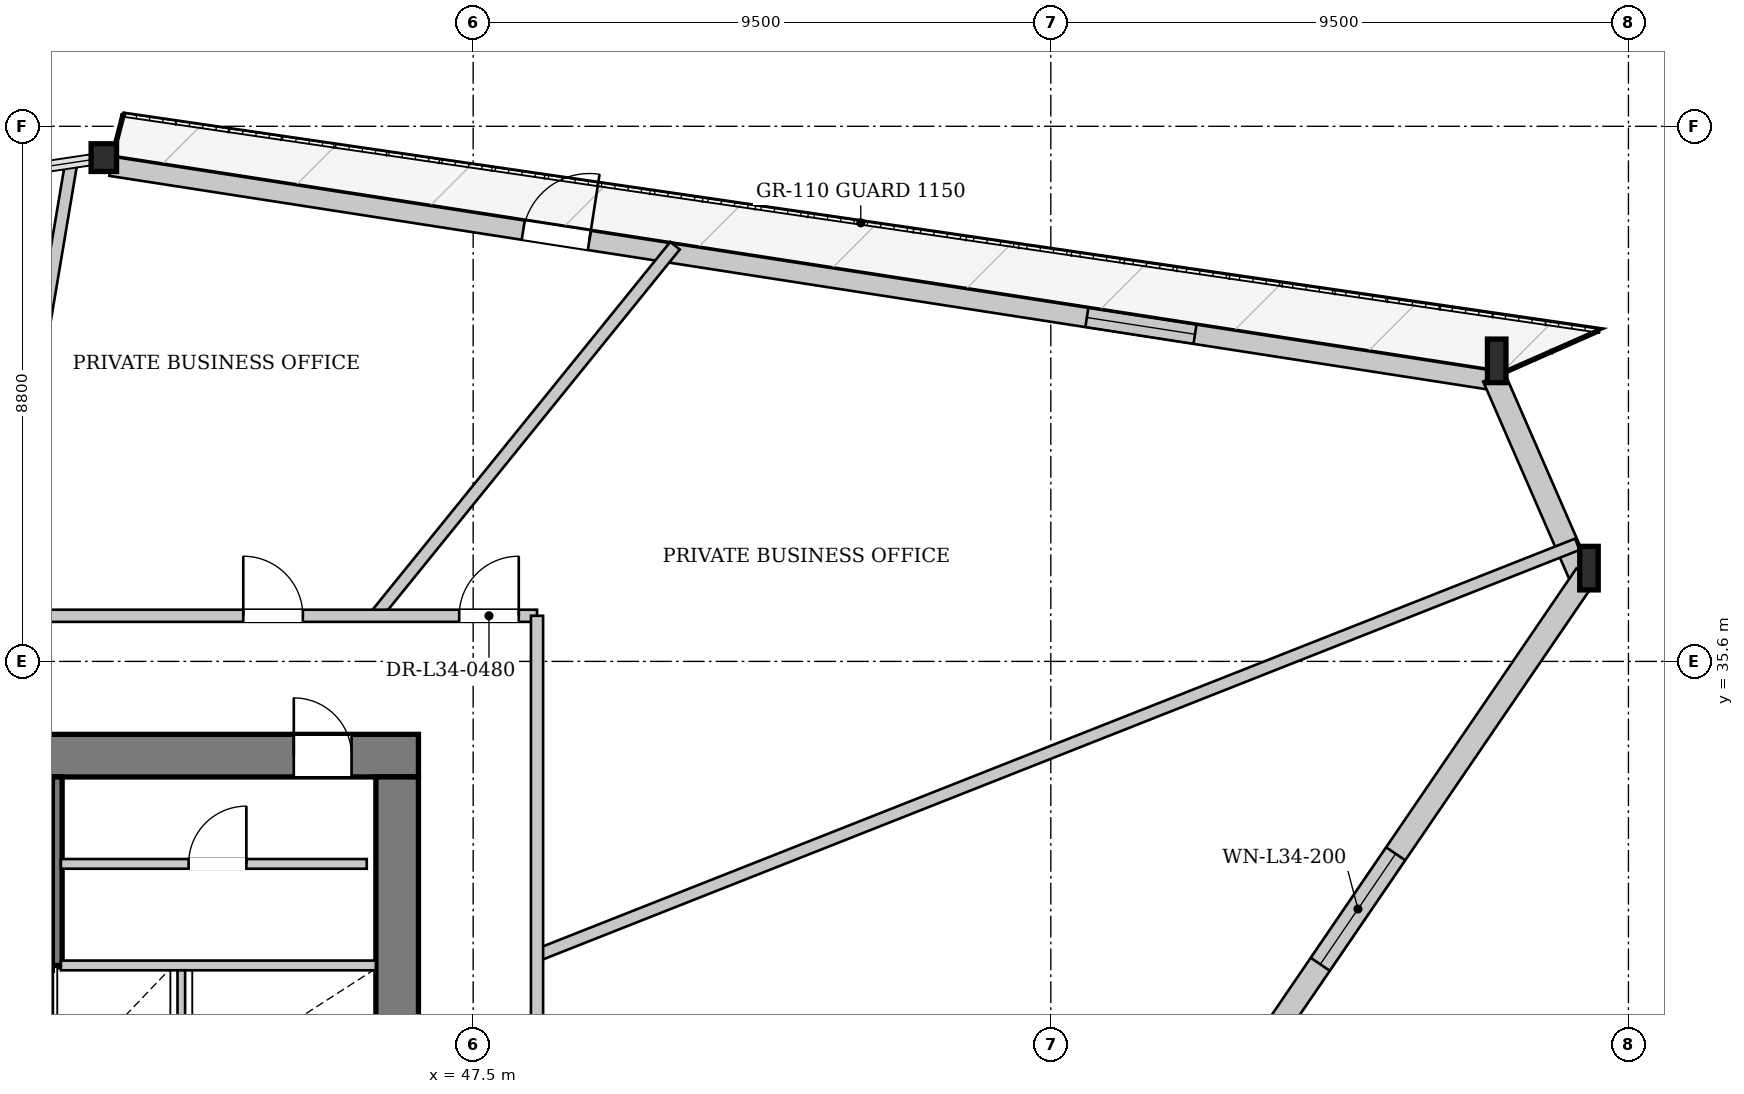
"""IFC4 building model, lengths in metres.
Left out: names, types, materials, properties, quantities, classifications, styles, units other than length and angle.
Written with IfcOpenShell. Run it as: python <this file> out.ifc"""

import sys

from ifc_helpers import new_model, si_unit, direction, frame, frame_2d, origin, origin_2d, place, context, subcontext, project, spatial, rectangle, i_section, extrude, source, transform, mapped, element, fill, save


model = new_model("IFC4")
c1 = context("Model", 3, precision=1e-05, world=origin(), true_north=direction((0.0, 1.0)))
c2 = subcontext(c1, "Body", "Model", "MODEL_VIEW")
j1 = project(units=[si_unit("LENGTHUNIT", "METRE"), si_unit("PLANEANGLEUNIT", "RADIAN")], contexts=[c1])
p1 = place(None, origin())
s1 = spatial("IfcSite", under=j1, at=p1, CompositionType="ELEMENT")
p2 = place(p1, origin())
s2 = spatial("IfcBuilding", under=s1, at=p2, CompositionType="ELEMENT")
p3 = place(p2, frame((0.0, 0.0, 130.55)))
s3 = spatial("IfcBuildingStorey", under=s2, at=p3, CompositionType="ELEMENT", Elevation=130.55)
m1 = source(origin(), c2, "Body", "SweptSolid", [
    extrude(i_section(OverallWidth=0.304, OverallDepth=0.716, WebThickness=0.021, FlangeThickness=0.04, at=origin_2d()), origin(), (0.0, 0.0, 1.0), 3.42),
])
p4 = place(p3, frame((65.958, 36.916, 0.0), z_axis=(-0.062468010228, 0.127648916899, 0.989850242063), x_axis=(-0.898212502069, -0.43956148731, 0.0)))
e1 = element("IfcColumn", 1, at=p4, inside=s3, PredefinedType="COLUMN", context=c2, shape_type="MappedRepresentation", body=[
    mapped(m1, transform((0.0, 0.0, 0.0), x_axis=(1.0, 0.0, 0.0), y_axis=(0.0, 1.0, 0.0), z_axis=(0.0, 0.0, 1.0), scale=1.0)),
])
m2 = source(origin(), c2, "Body", "SweptSolid", [
    extrude(i_section(OverallWidth=0.304, OverallDepth=0.716, WebThickness=0.021, FlangeThickness=0.04, at=origin_2d()), origin(), (0.0, 0.0, 1.0), 3.415),
])
p5 = place(p3, frame((64.459, 40.354, 0.0), z_axis=(-0.073629240078, 0.110586829515, 0.991135353089), x_axis=(-0.832381260917, -0.554203425174, 0.0)))
e2 = element("IfcColumn", 2, at=p5, inside=s3, PredefinedType="COLUMN", context=c2, shape_type="MappedRepresentation", body=[
    mapped(m2, transform((0.0, 0.0, 0.0), x_axis=(1.0, 0.0, 0.0), y_axis=(0.0, 1.0, 0.0), z_axis=(0.0, 0.0, 1.0), scale=1.0)),
])
m3 = source(origin(), c2, "Body", "SweptSolid", [
    extrude(i_section(OverallWidth=0.418, OverallDepth=0.455, WebThickness=0.038, FlangeThickness=0.059, at=origin_2d()), origin(), (0.0, 0.0, 1.0), 3.397),
])
p6 = place(p3, frame((41.566, 43.901, 0.0), z_axis=(-0.082512335001, -0.009487481028, 0.996544882219), x_axis=(0.114229941236, -0.993454337413, 0.0)))
e3 = element("IfcColumn", 3, at=p6, inside=s3, PredefinedType="COLUMN", context=c2, shape_type="MappedRepresentation", body=[
    mapped(m3, transform((0.0, 0.0, 0.0), x_axis=(1.0, 0.0, 0.0), y_axis=(0.0, 1.0, 0.0), z_axis=(0.0, 0.0, 1.0), scale=1.0)),
])
p7 = place(p3, frame((41.541, 43.743, 0.0), z_axis=(0.0, 0.0, 1.0), x_axis=(0.988207138031, -0.153122997436, 0.0)))
e4 = element("IfcWall", 4, at=p7, inside=s3, PredefinedType="SOLIDWALL", context=c2, shape_type="SweptSolid", body=[
    extrude(rectangle(XDim=23.167, YDim=0.32, at=frame_2d((11.583, 0.0))), origin(), (0.0, 0.0, 1.0), 2.692),
])
p8 = place(p7, frame((6.863, 0.0, 0.0)))
e5 = element("IfcOpeningElement", 5, at=p8, cuts=e4, PredefinedType="OPENING", context=c2, shape_type="SweptSolid", body=[
    extrude(rectangle(XDim=1.1, YDim=2.3, at=frame_2d((0.55, 1.15))), frame((0.0, 0.17, 0.0), z_axis=(0.0, -1.0, 0.0), x_axis=(1.0, 0.0, 0.0)), (0.0, 0.0, 1.0), 0.34),
])
p9 = place(p7, frame((16.243, 0.0, 0.372)))
e6 = element("IfcOpeningElement", 6, at=p9, cuts=e4, PredefinedType="OPENING", context=c2, shape_type="SweptSolid", body=[
    extrude(rectangle(XDim=1.8, YDim=2.2, at=frame_2d((0.9, 1.1))), frame((0.0, 0.17, 0.0), z_axis=(0.0, -1.0, 0.0), x_axis=(1.0, 0.0, 0.0)), (0.0, 0.0, 1.0), 0.34),
])
p10 = place(p3, frame((64.285, 40.278, 0.0), z_axis=(0.0, 0.0, 1.0), x_axis=(0.399568588601, -0.916703301512, 0.0)))
e7 = element("IfcWall", 7, at=p10, inside=s3, PredefinedType="SOLIDWALL", context=c2, shape_type="SweptSolid", body=[
    extrude(rectangle(XDim=3.75, YDim=0.38, at=frame_2d((1.875, 0.0))), origin(), (0.0, 0.0, 1.0), 2.692),
])
p11 = place(p3, frame((65.801, 37.023, 0.0), z_axis=(0.0, 0.0, 1.0), x_axis=(-0.563622492104, -0.826032497179, 0.0)))
e8 = element("IfcWall", 8, at=p11, inside=s3, PredefinedType="SOLIDWALL", context=c2, shape_type="SweptSolid", body=[
    extrude(rectangle(XDim=23.758, YDim=0.38, at=frame_2d((11.879, 0.0))), origin(), (0.0, 0.0, 1.0), 2.692),
])
p12 = place(p11, frame((5.552, 0.0, 0.322)))
e9 = element("IfcOpeningElement", 9, at=p12, cuts=e8, PredefinedType="OPENING", context=c2, shape_type="SweptSolid", body=[
    extrude(rectangle(XDim=2.2, YDim=2.25, at=frame_2d((1.1, 1.125))), frame((0.0, 0.2, 0.0), z_axis=(0.0, -1.0, 0.0), x_axis=(1.0, 0.0, 0.0)), (0.0, 0.0, 1.0), 0.4),
])
p13 = place(p11, frame((16.756, 0.0, 0.322)))
e10 = element("IfcOpeningElement", 10, at=p13, cuts=e8, PredefinedType="OPENING", context=c2, shape_type="SweptSolid", body=[
    extrude(rectangle(XDim=2.2, YDim=2.25, at=frame_2d((1.1, 1.125))), frame((0.0, 0.2, 0.0), z_axis=(0.0, -1.0, 0.0), x_axis=(1.0, 0.0, 0.0)), (0.0, 0.0, 1.0), 0.4),
])
p14 = place(p3, frame((29.4, 34.05, 0.0), z_axis=(0.0, 0.0, 1.0), x_axis=(1.0, 0.0, 0.0)))
e11 = element("IfcWall", 11, at=p14, inside=s3, PredefinedType="SHEAR", context=c2, shape_type="SweptSolid", body=[
    extrude(rectangle(XDim=17.2, YDim=0.7, at=frame_2d((8.6, 0.0))), origin(), (0.0, 0.0, 1.0), 3.3),
])
p15 = place(p14, frame((1.7, 0.0, 0.0)))
e12 = element("IfcOpeningElement", 12, at=p15, cuts=e11, PredefinedType="OPENING", context=c2, shape_type="SweptSolid", body=[
    extrude(rectangle(XDim=0.95, YDim=2.1, at=frame_2d((0.475, 1.05))), frame((0.0, 0.36, 0.0), z_axis=(0.0, -1.0, 0.0), x_axis=(1.0, 0.0, 0.0)), (0.0, 0.0, 1.0), 0.72),
])
p16 = place(p14, frame((4.08, 0.0, 0.0)))
e13 = element("IfcOpeningElement", 13, at=p16, cuts=e11, PredefinedType="OPENING", context=c2, shape_type="SweptSolid", body=[
    extrude(rectangle(XDim=1.32, YDim=2.2, at=frame_2d((0.66, 1.1))), frame((0.0, 0.36, 0.0), z_axis=(0.0, -1.0, 0.0), x_axis=(1.0, 0.0, 0.0)), (0.0, 0.0, 1.0), 0.72),
])
p17 = place(p14, frame((15.15, 0.0, 0.0)))
e14 = element("IfcOpeningElement", 14, at=p17, cuts=e11, PredefinedType="OPENING", context=c2, shape_type="SweptSolid", body=[
    extrude(rectangle(XDim=0.95, YDim=2.1, at=frame_2d((0.475, 1.05))), frame((0.0, 0.36, 0.0), z_axis=(0.0, -1.0, 0.0), x_axis=(1.0, 0.0, 0.0)), (0.0, 0.0, 1.0), 0.72),
])
p18 = place(p3, frame((46.25, 33.7, 0.0), z_axis=(0.0, 0.0, 1.0), x_axis=(0.0, -1.0, 0.0)))
e15 = element("IfcWall", 15, at=p18, inside=s3, PredefinedType="SHEAR", context=c2, shape_type="SweptSolid", body=[
    extrude(rectangle(XDim=14.2, YDim=0.7, at=frame_2d((7.1, 0.0))), origin(), (0.0, 0.0, 1.0), 3.3),
])
p19 = place(p18, frame((5.18, 0.0, 0.0)))
e16 = element("IfcOpeningElement", 16, at=p19, cuts=e15, PredefinedType="OPENING", context=c2, shape_type="SweptSolid", body=[
    extrude(rectangle(XDim=1.6, YDim=2.2, at=frame_2d((0.8, 1.1))), frame((0.0, 0.36, 0.0), z_axis=(0.0, -1.0, 0.0), x_axis=(1.0, 0.0, 0.0)), (0.0, 0.0, 1.0), 0.72),
])
p20 = place(p3, frame((33.28, 30.6, 0.0), z_axis=(0.0, 0.0, 1.0), x_axis=(1.0, 0.0, 0.0)))
e17 = element("IfcWall", 17, at=p20, inside=s3, PredefinedType="PARTITIONING", context=c2, shape_type="SweptSolid", body=[
    extrude(rectangle(XDim=7.3, YDim=0.16, at=frame_2d((3.65, 0.0))), origin(), (0.0, 0.0, 1.0), 3.3),
])
p21 = place(p3, frame((40.66, 30.6, 0.0), z_axis=(0.0, 0.0, 1.0), x_axis=(0.0, 1.0, 0.0)))
e18 = element("IfcWall", 18, at=p21, inside=s3, PredefinedType="PARTITIONING", context=c2, shape_type="SweptSolid", body=[
    extrude(rectangle(XDim=3.1, YDim=0.16, at=frame_2d((1.55, 0.0))), origin(), (0.0, 0.0, 1.0), 3.3),
])
p22 = place(p3, frame((40.72, 30.6, 0.0), z_axis=(0.0, 0.0, 1.0), x_axis=(1.0, 0.0, 0.0)))
e19 = element("IfcWall", 19, at=p22, inside=s3, PredefinedType="PARTITIONING", context=c2, shape_type="SweptSolid", body=[
    extrude(rectangle(XDim=5.18, YDim=0.16, at=frame_2d((2.59, 0.0))), origin(), (0.0, 0.0, 1.0), 3.3),
])
for number, where, z_axis, x_axis in (
    (20, (40.525, 28.6, 0.0), (0.0, 0.0, 1.0), (0.0, 1.0, 0.0)),
    (21, (42.7, 28.6, 0.0), (0.0, 0.0, 1.0), (0.0, 1.0, 0.0)),
):
    element("IfcWall", number, at=place(p3, frame(where, z_axis=z_axis, x_axis=x_axis)), inside=s3, PredefinedType="PARTITIONING", context=c2, shape_type="SweptSolid", body=[
        extrude(rectangle(XDim=1.92, YDim=0.125, at=frame_2d((0.96, 0.0))), origin(), (0.0, 0.0, 1.0), 3.3),
    ])
p23 = place(p3, frame((40.72, 32.27, 0.0), z_axis=(0.0, 0.0, 1.0), x_axis=(1.0, 0.0, 0.0)))
e22 = element("IfcWall", 22, at=p23, inside=s3, PredefinedType="PARTITIONING", context=c2, shape_type="SweptSolid", body=[
    extrude(rectangle(XDim=5.03, YDim=0.16, at=frame_2d((2.515, 0.0))), origin(), (0.0, 0.0, 1.0), 3.3),
])
p24 = place(p23, frame((2.1, 0.0, 0.0)))
e23 = element("IfcOpeningElement", 23, at=p24, cuts=e22, PredefinedType="OPENING", context=c2, shape_type="SweptSolid", body=[
    extrude(rectangle(XDim=0.95, YDim=2.1, at=frame_2d((0.475, 1.05))), frame((0.0, 0.09, 0.0), z_axis=(0.0, -1.0, 0.0), x_axis=(1.0, 0.0, 0.0)), (0.0, 0.0, 1.0), 0.18),
])
p25 = place(p3, frame((48.55, 30.767, 0.0), z_axis=(0.0, 0.0, 1.0), x_axis=(0.930068002608, 0.367387412038, 0.0)))
e24 = element("IfcWall", 24, at=p25, inside=s3, PredefinedType="PARTITIONING", context=c2, shape_type="SweptSolid", body=[
    extrude(rectangle(XDim=18.396, YDim=0.2, at=frame_2d((9.198, 0.0))), origin(), (0.0, 0.0, 1.0), 2.795),
])
p26 = place(p3, frame((45.893, 36.35, 0.0), z_axis=(0.0, 0.0, 1.0), x_axis=(0.62920899099, 0.777236158229, 0.0)))
e25 = element("IfcWall", 25, at=p26, inside=s3, PredefinedType="PARTITIONING", context=c2, shape_type="SweptSolid", body=[
    extrude(rectangle(XDim=7.831, YDim=0.2, at=frame_2d((3.916, 0.0))), origin(), (0.0, 0.0, 1.0), 3.3),
])
p27 = place(p3, frame((39.638, 36.35, 0.0), z_axis=(0.0, 0.0, 1.0), x_axis=(0.165688318352, 0.986178169076, 0.0)))
e26 = element("IfcWall", 26, at=p27, inside=s3, PredefinedType="PARTITIONING", context=c2, shape_type="SweptSolid", body=[
    extrude(rectangle(XDim=7.522, YDim=0.2, at=frame_2d((3.761, 0.0))), origin(), (0.0, 0.0, 1.0), 2.785),
])
p28 = place(p3, frame((27.45, 36.35, 0.0), z_axis=(0.0, 0.0, 1.0), x_axis=(1.0, 0.0, 0.0)))
e27 = element("IfcWall", 27, at=p28, inside=s3, PredefinedType="PARTITIONING", context=c2, shape_type="SweptSolid", body=[
    extrude(rectangle(XDim=21.1, YDim=0.2, at=frame_2d((10.55, 0.0))), origin(), (0.0, 0.0, 1.0), 3.3),
])
p29 = place(p28, frame((19.82, 0.0, 0.0)))
e28 = element("IfcOpeningElement", 28, at=p29, cuts=e27, PredefinedType="OPENING", context=c2, shape_type="SweptSolid", body=[
    extrude(rectangle(XDim=0.98, YDim=2.15, at=frame_2d((0.49, 1.075))), frame((0.0, 0.11, 0.0), z_axis=(0.0, -1.0, 0.0), x_axis=(1.0, 0.0, 0.0)), (0.0, 0.0, 1.0), 0.22),
])
p30 = place(p28, frame((16.269, 0.0, 0.0)))
e29 = element("IfcOpeningElement", 29, at=p30, cuts=e27, PredefinedType="OPENING", context=c2, shape_type="SweptSolid", body=[
    extrude(rectangle(XDim=0.98, YDim=2.15, at=frame_2d((0.49, 1.075))), frame((0.0, 0.11, 0.0), z_axis=(0.0, -1.0, 0.0), x_axis=(1.0, 0.0, 0.0)), (0.0, 0.0, 1.0), 0.22),
])
p31 = place(p28, frame((8.824, 0.0, 0.0)))
e30 = element("IfcOpeningElement", 30, at=p31, cuts=e27, PredefinedType="OPENING", context=c2, shape_type="SweptSolid", body=[
    extrude(rectangle(XDim=0.98, YDim=2.15, at=frame_2d((0.49, 1.075))), frame((0.0, 0.11, 0.0), z_axis=(0.0, -1.0, 0.0), x_axis=(1.0, 0.0, 0.0)), (0.0, 0.0, 1.0), 0.22),
])
p32 = place(p28, frame((0.956, 0.0, 0.0)))
e31 = element("IfcOpeningElement", 31, at=p32, cuts=e27, PredefinedType="OPENING", context=c2, shape_type="SweptSolid", body=[
    extrude(rectangle(XDim=0.98, YDim=2.15, at=frame_2d((0.49, 1.075))), frame((0.0, 0.11, 0.0), z_axis=(0.0, -1.0, 0.0), x_axis=(1.0, 0.0, 0.0)), (0.0, 0.0, 1.0), 0.22),
])
p33 = place(p3, frame((48.55, 16.85, 0.0), z_axis=(0.0, 0.0, 1.0), x_axis=(0.0, 1.0, 0.0)))
e32 = element("IfcWall", 32, at=p33, inside=s3, PredefinedType="PARTITIONING", context=c2, shape_type="SweptSolid", body=[
    extrude(rectangle(XDim=19.5, YDim=0.2, at=frame_2d((9.75, 0.0))), origin(), (0.0, 0.0, 1.0), 3.3),
])
p34 = place(p33, frame((10.625, 0.0, 0.0)))
e33 = element("IfcOpeningElement", 33, at=p34, cuts=e32, PredefinedType="OPENING", context=c2, shape_type="SweptSolid", body=[
    extrude(rectangle(XDim=0.98, YDim=2.15, at=frame_2d((0.49, 1.075))), frame((0.0, 0.11, 0.0), z_axis=(0.0, -1.0, 0.0), x_axis=(1.0, 0.0, 0.0)), (0.0, 0.0, 1.0), 0.22),
])
p35 = place(p33, frame((2.207, 0.0, 0.0)))
e34 = element("IfcOpeningElement", 34, at=p35, cuts=e32, PredefinedType="OPENING", context=c2, shape_type="SweptSolid", body=[
    extrude(rectangle(XDim=0.98, YDim=2.15, at=frame_2d((0.49, 1.075))), frame((0.0, 0.11, 0.0), z_axis=(0.0, -1.0, 0.0), x_axis=(1.0, 0.0, 0.0)), (0.0, 0.0, 1.0), 0.22),
])
m4 = source(origin(), c2, "Body", "SweptSolid", [
    extrude(rectangle(XDim=1.1, YDim=2.3, at=frame_2d((0.55, 1.15))), frame((0.0, 0.025, 0.0), z_axis=(0.0, -1.0, 0.0), x_axis=(1.0, 0.0, 0.0)), (0.0, 0.0, 1.0), 0.05),
])
p36 = place(p8, origin())
e35 = element("IfcDoor", 35, at=p36, inside=s3, OperationType="SINGLE_SWING_RIGHT", PredefinedType="DOOR", context=c2, shape_type="MappedRepresentation", body=[
    mapped(m4, transform((0.0, 0.0, 0.0), x_axis=(1.0, 0.0, 0.0), y_axis=(0.0, 1.0, 0.0), z_axis=(0.0, 0.0, 1.0), scale=1.0)),
])
fill(e5, e35)
m5 = source(origin(), c2, "Body", "SweptSolid", [
    extrude(rectangle(XDim=1.8, YDim=2.2, at=frame_2d((0.9, 1.1))), frame((0.0, 0.03, 0.0), z_axis=(0.0, -1.0, 0.0), x_axis=(1.0, 0.0, 0.0)), (0.0, 0.0, 1.0), 0.06),
])
p37 = place(p9, origin())
e36 = element("IfcWindow", 36, at=p37, inside=s3, PartitioningType="SINGLE_PANEL", PredefinedType="WINDOW", context=c2, shape_type="MappedRepresentation", body=[
    mapped(m5, transform((0.0, 0.0, 0.0), x_axis=(1.0, 0.0, 0.0), y_axis=(0.0, 1.0, 0.0), z_axis=(0.0, 0.0, 1.0), scale=1.0)),
])
fill(e6, e36)
m6 = source(origin(), c2, "Body", "SweptSolid", [
    extrude(rectangle(XDim=2.2, YDim=2.25, at=frame_2d((1.1, 1.125))), frame((0.0, 0.03, 0.0), z_axis=(0.0, -1.0, 0.0), x_axis=(1.0, 0.0, 0.0)), (0.0, 0.0, 1.0), 0.06),
])
p38 = place(p12, origin())
e37 = element("IfcWindow", 37, at=p38, inside=s3, PartitioningType="SINGLE_PANEL", PredefinedType="WINDOW", context=c2, shape_type="MappedRepresentation", body=[
    mapped(m6, transform((0.0, 0.0, 0.0), x_axis=(1.0, 0.0, 0.0), y_axis=(0.0, 1.0, 0.0), z_axis=(0.0, 0.0, 1.0), scale=1.0)),
])
fill(e9, e37)
m7 = source(origin(), c2, "Body", "SweptSolid", [
    extrude(rectangle(XDim=0.95, YDim=2.1, at=frame_2d((0.475, 1.05))), frame((0.0, 0.025, 0.0), z_axis=(0.0, -1.0, 0.0), x_axis=(1.0, 0.0, 0.0)), (0.0, 0.0, 1.0), 0.05),
])
p39 = place(p24, origin())
e38 = element("IfcDoor", 38, at=p39, inside=s3, OperationType="SINGLE_SWING_RIGHT", PredefinedType="DOOR", context=c2, shape_type="MappedRepresentation", body=[
    mapped(m7, transform((0.0, 0.0, 0.0), x_axis=(1.0, 0.0, 0.0), y_axis=(0.0, 1.0, 0.0), z_axis=(0.0, 0.0, 1.0), scale=1.0)),
])
fill(e23, e38)
p40 = place(p17, origin())
e39 = element("IfcDoor", 39, at=p40, inside=s3, OperationType="SINGLE_SWING_LEFT", PredefinedType="DOOR", context=c2, shape_type="MappedRepresentation", body=[
    mapped(m7, transform((0.0, 0.0, 0.0), x_axis=(1.0, 0.0, 0.0), y_axis=(0.0, 1.0, 0.0), z_axis=(0.0, 0.0, 1.0), scale=1.0)),
])
fill(e14, e39)
m8 = source(origin(), c2, "Body", "SweptSolid", [
    extrude(rectangle(XDim=0.98, YDim=2.15, at=frame_2d((0.49, 1.075))), frame((0.0, 0.025, 0.0), z_axis=(0.0, -1.0, 0.0), x_axis=(1.0, 0.0, 0.0)), (0.0, 0.0, 1.0), 0.05),
])
p41 = place(p29, origin())
e40 = element("IfcDoor", 40, at=p41, inside=s3, OperationType="SINGLE_SWING_RIGHT", PredefinedType="DOOR", context=c2, shape_type="MappedRepresentation", body=[
    mapped(m8, transform((0.0, 0.0, 0.0), x_axis=(1.0, 0.0, 0.0), y_axis=(0.0, 1.0, 0.0), z_axis=(0.0, 0.0, 1.0), scale=1.0)),
])
fill(e28, e40)
p42 = place(p30, origin())
e41 = element("IfcDoor", 41, at=p42, inside=s3, OperationType="SINGLE_SWING_LEFT", PredefinedType="DOOR", context=c2, shape_type="MappedRepresentation", body=[
    mapped(m8, transform((0.0, 0.0, 0.0), x_axis=(1.0, 0.0, 0.0), y_axis=(0.0, 1.0, 0.0), z_axis=(0.0, 0.0, 1.0), scale=1.0)),
])
fill(e29, e41)
save(model, sys.argv[1])
